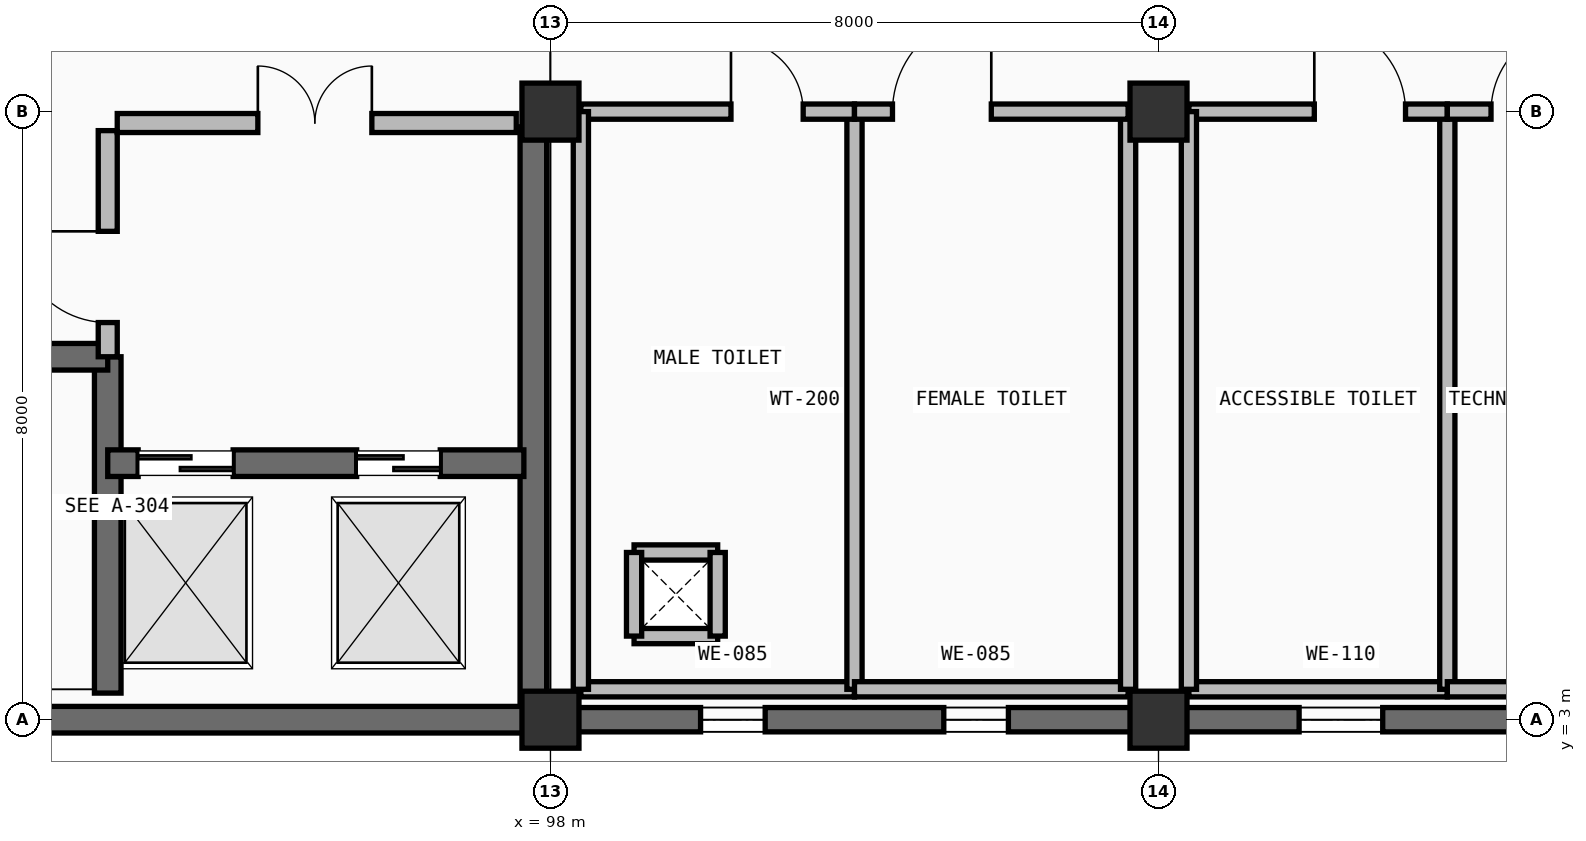
"""IFC4 building model, lengths in metres.
Left out: names, types, materials, properties, quantities, classifications, styles, units other than length and angle.
Written with IfcOpenShell. Run it as: python <this file> out.ifc"""

import sys

from ifc_helpers import new_model, si_unit, direction, frame, frame_2d, origin, origin_2d, place, context, subcontext, project, spatial, rectangle, extrude, element, fill, save


model = new_model("IFC4")
c1 = context("Model", 3, precision=1e-05, world=origin(), true_north=direction((0.0, 1.0)))
c2 = subcontext(c1, "Body", "Model", "MODEL_VIEW")
j1 = project(units=[si_unit("LENGTHUNIT", "METRE"), si_unit("PLANEANGLEUNIT", "RADIAN")], contexts=[c1])
p1 = place(None, origin())
s1 = spatial("IfcSite", under=j1, at=p1, CompositionType="ELEMENT")
p2 = place(p1, origin())
s2 = spatial("IfcBuilding", under=s1, at=p2, CompositionType="ELEMENT")
p3 = place(p2, origin())
s3 = spatial("IfcBuildingStorey", under=s2, at=p3, CompositionType="ELEMENT", Elevation=0.0)
for number, where, z_axis, x_axis in (
    (1, (98.0, 3.0, 0.0), (0.0, 0.0, 1.0), (1.0, 0.0, 0.0)),
    (2, (98.0, 11.0, 0.0), (0.0, 0.0, 1.0), (1.0, 0.0, 0.0)),
    (3, (106.0, 3.0, 0.0), (0.0, 0.0, 1.0), (1.0, 0.0, 0.0)),
    (4, (106.0, 11.0, 0.0), (0.0, 0.0, 1.0), (1.0, 0.0, 0.0)),
):
    element("IfcColumn", number, at=place(p3, frame(where, z_axis=z_axis, x_axis=x_axis)), inside=s3, PredefinedType="COLUMN", context=c2, shape_type="SweptSolid", body=[
        extrude(rectangle(XDim=0.75, YDim=0.75, at=origin_2d()), origin(), (0.0, 0.0, 1.0), 5.4),
    ])
p4 = place(p3, frame((114.0, 3.0, 0.0), z_axis=(0.0, 0.0, 1.0), x_axis=(-1.0, 0.0, 0.0)))
e5 = element("IfcWall", 5, at=p4, inside=s3, PredefinedType="SOLIDWALL", context=c2, shape_type="SweptSolid", body=[
    extrude(rectangle(XDim=8.0, YDim=0.32, at=frame_2d((4.0, 0.0))), origin(), (0.0, 0.0, 1.0), 5.4),
])
p5 = place(p4, frame((1.85, 0.0, 1.0)))
e6 = element("IfcOpeningElement", 6, at=p5, cuts=e5, PredefinedType="OPENING", context=c2, shape_type="SweptSolid", body=[
    extrude(rectangle(XDim=1.1, YDim=1.45, at=frame_2d((0.55, 0.725))), frame((0.0, 0.17, 0.0), z_axis=(0.0, -1.0, 0.0), x_axis=(1.0, 0.0, 0.0)), (0.0, 0.0, 1.0), 0.34),
])
p6 = place(p4, frame((5.05, 0.0, 1.0)))
e7 = element("IfcOpeningElement", 7, at=p6, cuts=e5, PredefinedType="OPENING", context=c2, shape_type="SweptSolid", body=[
    extrude(rectangle(XDim=1.1, YDim=1.45, at=frame_2d((0.55, 0.725))), frame((0.0, 0.17, 0.0), z_axis=(0.0, -1.0, 0.0), x_axis=(1.0, 0.0, 0.0)), (0.0, 0.0, 1.0), 0.34),
])
p7 = place(p3, frame((106.0, 3.0, 0.0), z_axis=(0.0, 0.0, 1.0), x_axis=(-1.0, 0.0, 0.0)))
e8 = element("IfcWall", 8, at=p7, inside=s3, PredefinedType="SOLIDWALL", context=c2, shape_type="SweptSolid", body=[
    extrude(rectangle(XDim=8.0, YDim=0.32, at=frame_2d((4.0, 0.0))), origin(), (0.0, 0.0, 1.0), 5.4),
])
p8 = place(p7, frame((1.975, 0.0, 1.0)))
e9 = element("IfcOpeningElement", 9, at=p8, cuts=e8, PredefinedType="OPENING", context=c2, shape_type="SweptSolid", body=[
    extrude(rectangle(XDim=0.85, YDim=1.2, at=frame_2d((0.425, 0.6))), frame((0.0, 0.17, 0.0), z_axis=(0.0, -1.0, 0.0), x_axis=(1.0, 0.0, 0.0)), (0.0, 0.0, 1.0), 0.34),
])
p9 = place(p7, frame((5.175, 0.0, 1.0)))
e10 = element("IfcOpeningElement", 10, at=p9, cuts=e8, PredefinedType="OPENING", context=c2, shape_type="SweptSolid", body=[
    extrude(rectangle(XDim=0.85, YDim=1.2, at=frame_2d((0.425, 0.6))), frame((0.0, 0.17, 0.0), z_axis=(0.0, -1.0, 0.0), x_axis=(1.0, 0.0, 0.0)), (0.0, 0.0, 1.0), 0.34),
])
p10 = place(p3, frame((98.0, 3.0, 0.0), z_axis=(0.0, 0.0, 1.0), x_axis=(-1.0, 0.0, 0.0)))
e11 = element("IfcWall", 11, at=p10, inside=s3, PredefinedType="SHEAR", context=c2, shape_type="SweptSolid", body=[
    extrude(rectangle(XDim=8.0, YDim=0.35, at=frame_2d((4.0, 0.0))), origin(), (0.0, 0.0, 1.0), 5.4),
])
p11 = place(p3, frame((92.175, 3.35, 0.0), z_axis=(0.0, 0.0, 1.0), x_axis=(0.0, 1.0, 0.0)))
e12 = element("IfcWall", 12, at=p11, inside=s3, PredefinedType="SHEAR", context=c2, shape_type="SweptSolid", body=[
    extrude(rectangle(XDim=4.425, YDim=0.35, at=frame_2d((2.212, 0.0))), origin(), (0.0, 0.0, 1.0), 5.1),
])
p12 = place(p3, frame((97.775, 3.2, 0.0), z_axis=(0.0, 0.0, 1.0), x_axis=(0.0, 1.0, 0.0)))
e13 = element("IfcWall", 13, at=p12, inside=s3, PredefinedType="SHEAR", context=c2, shape_type="SweptSolid", body=[
    extrude(rectangle(XDim=7.6, YDim=0.35, at=frame_2d((3.8, 0.0))), origin(), (0.0, 0.0, 1.0), 5.1),
])
p13 = place(p3, frame((82.35, 7.775, 0.0), z_axis=(0.0, 0.0, 1.0), x_axis=(1.0, 0.0, 0.0)))
e14 = element("IfcWall", 14, at=p13, inside=s3, PredefinedType="SHEAR", context=c2, shape_type="SweptSolid", body=[
    extrude(rectangle(XDim=9.825, YDim=0.35, at=frame_2d((4.913, 0.0))), origin(), (0.0, 0.0, 1.0), 5.1),
])
p14 = place(p13, frame((0.4, 0.0, 0.0)))
e15 = element("IfcOpeningElement", 15, at=p14, cuts=e14, PredefinedType="OPENING", context=c2, shape_type="SweptSolid", body=[
    extrude(rectangle(XDim=1.85, YDim=2.25, at=frame_2d((0.925, 1.125))), frame((0.0, 0.185, 0.0), z_axis=(0.0, -1.0, 0.0), x_axis=(1.0, 0.0, 0.0)), (0.0, 0.0, 1.0), 0.37),
])
p15 = place(p3, frame((92.175, 6.375, 0.0), z_axis=(0.0, 0.0, 1.0), x_axis=(1.0, 0.0, 0.0)))
e16 = element("IfcWall", 16, at=p15, inside=s3, PredefinedType="SHEAR", context=c2, shape_type="SweptSolid", body=[
    extrude(rectangle(XDim=5.475, YDim=0.35, at=frame_2d((2.737, 0.0))), origin(), (0.0, 0.0, 1.0), 5.1),
])
p16 = place(p15, frame((0.4, 0.0, 0.0)))
e17 = element("IfcOpeningElement", 17, at=p16, cuts=e16, PredefinedType="OPENING", context=c2, shape_type="SweptSolid", body=[
    extrude(rectangle(XDim=1.25, YDim=2.25, at=frame_2d((0.625, 1.125))), frame((0.0, 0.185, 0.0), z_axis=(0.0, -1.0, 0.0), x_axis=(1.0, 0.0, 0.0)), (0.0, 0.0, 1.0), 0.37),
])
p17 = place(p15, frame((3.275, 0.0, 0.0)))
e18 = element("IfcOpeningElement", 18, at=p17, cuts=e16, PredefinedType="OPENING", context=c2, shape_type="SweptSolid", body=[
    extrude(rectangle(XDim=1.1, YDim=2.2, at=frame_2d((0.55, 1.1))), frame((0.0, 0.185, 0.0), z_axis=(0.0, -1.0, 0.0), x_axis=(1.0, 0.0, 0.0)), (0.0, 0.0, 1.0), 0.37),
])
p18 = place(p3, frame((92.175, 7.775, 0.0), z_axis=(0.0, 0.0, 1.0), x_axis=(0.0, 1.0, 0.0)))
e19 = element("IfcWall", 19, at=p18, inside=s3, PredefinedType="PARTITIONING", context=c2, shape_type="SweptSolid", body=[
    extrude(rectangle(XDim=2.975, YDim=0.25, at=frame_2d((1.488, 0.0))), origin(), (0.0, 0.0, 1.0), 5.1),
])
p19 = place(p18, frame((0.45, 0.0, 0.0)))
e20 = element("IfcOpeningElement", 20, at=p19, cuts=e19, PredefinedType="OPENING", context=c2, shape_type="SweptSolid", body=[
    extrude(rectangle(XDim=1.2, YDim=2.2, at=frame_2d((0.6, 1.1))), frame((0.0, 0.135, 0.0), z_axis=(0.0, -1.0, 0.0), x_axis=(1.0, 0.0, 0.0)), (0.0, 0.0, 1.0), 0.27),
])
p20 = place(p3, frame((92.3, 10.85, 0.0), z_axis=(0.0, 0.0, 1.0), x_axis=(1.0, 0.0, 0.0)))
e21 = element("IfcWall", 21, at=p20, inside=s3, PredefinedType="PARTITIONING", context=c2, shape_type="SweptSolid", body=[
    extrude(rectangle(XDim=5.25, YDim=0.25, at=frame_2d((2.625, 0.0))), origin(), (0.0, 0.0, 1.0), 4.335),
])
p21 = place(p20, frame((1.85, 0.0, 0.0)))
e22 = element("IfcOpeningElement", 22, at=p21, cuts=e21, PredefinedType="OPENING", context=c2, shape_type="SweptSolid", body=[
    extrude(rectangle(XDim=1.5, YDim=2.2, at=frame_2d((0.75, 1.1))), frame((0.0, 0.135, 0.0), z_axis=(0.0, -1.0, 0.0), x_axis=(1.0, 0.0, 0.0)), (0.0, 0.0, 1.0), 0.27),
])
p22 = place(p3, frame((98.4, 3.4, 0.0), z_axis=(0.0, 0.0, 1.0), x_axis=(1.0, 0.0, 0.0)))
e23 = element("IfcWall", 23, at=p22, inside=s3, PredefinedType="PARTITIONING", context=c2, shape_type="SweptSolid", body=[
    extrude(rectangle(XDim=3.6, YDim=0.2, at=frame_2d((1.8, 0.0))), origin(), (0.0, 0.0, 1.0), 4.405),
])
p23 = place(p3, frame((102.0, 3.4, 0.0), z_axis=(0.0, 0.0, 1.0), x_axis=(0.0, 1.0, 0.0)))
e24 = element("IfcWall", 24, at=p23, inside=s3, PredefinedType="PARTITIONING", context=c2, shape_type="SweptSolid", body=[
    extrude(rectangle(XDim=7.6, YDim=0.2, at=frame_2d((3.8, 0.0))), origin(), (0.0, 0.0, 1.0), 4.535),
])
p24 = place(p3, frame((98.4, 11.0, 0.0), z_axis=(0.0, 0.0, 1.0), x_axis=(1.0, 0.0, 0.0)))
e25 = element("IfcWall", 25, at=p24, inside=s3, PredefinedType="PARTITIONING", context=c2, shape_type="SweptSolid", body=[
    extrude(rectangle(XDim=3.6, YDim=0.2, at=frame_2d((1.8, 0.0))), origin(), (0.0, 0.0, 1.0), 4.335),
])
p25 = place(p24, frame((1.975, 0.0, 0.0)))
e26 = element("IfcOpeningElement", 26, at=p25, cuts=e25, PredefinedType="OPENING", context=c2, shape_type="SweptSolid", body=[
    extrude(rectangle(XDim=0.95, YDim=2.1, at=frame_2d((0.475, 1.05))), frame((0.0, 0.11, 0.0), z_axis=(0.0, -1.0, 0.0), x_axis=(1.0, 0.0, 0.0)), (0.0, 0.0, 1.0), 0.22),
])
p26 = place(p3, frame((98.4, 3.4, 0.0), z_axis=(0.0, 0.0, 1.0), x_axis=(0.0, 1.0, 0.0)))
e27 = element("IfcWall", 27, at=p26, inside=s3, PredefinedType="PARTITIONING", context=c2, shape_type="SweptSolid", body=[
    extrude(rectangle(XDim=7.6, YDim=0.2, at=frame_2d((3.8, 0.0))), origin(), (0.0, 0.0, 1.0), 4.385),
])
p27 = place(p3, frame((102.0, 3.4, 0.0), z_axis=(0.0, 0.0, 1.0), x_axis=(1.0, 0.0, 0.0)))
e28 = element("IfcWall", 28, at=p27, inside=s3, PredefinedType="PARTITIONING", context=c2, shape_type="SweptSolid", body=[
    extrude(rectangle(XDim=3.6, YDim=0.2, at=frame_2d((1.8, 0.0))), origin(), (0.0, 0.0, 1.0), 4.405),
])
p28 = place(p3, frame((105.6, 3.4, 0.0), z_axis=(0.0, 0.0, 1.0), x_axis=(0.0, 1.0, 0.0)))
e29 = element("IfcWall", 29, at=p28, inside=s3, PredefinedType="PARTITIONING", context=c2, shape_type="SweptSolid", body=[
    extrude(rectangle(XDim=7.6, YDim=0.2, at=frame_2d((3.8, 0.0))), origin(), (0.0, 0.0, 1.0), 4.385),
])
p29 = place(p3, frame((102.0, 11.0, 0.0), z_axis=(0.0, 0.0, 1.0), x_axis=(1.0, 0.0, 0.0)))
e30 = element("IfcWall", 30, at=p29, inside=s3, PredefinedType="PARTITIONING", context=c2, shape_type="SweptSolid", body=[
    extrude(rectangle(XDim=3.6, YDim=0.2, at=frame_2d((1.8, 0.0))), origin(), (0.0, 0.0, 1.0), 4.335),
])
p30 = place(p29, frame((0.5, 0.0, 0.0)))
e31 = element("IfcOpeningElement", 31, at=p30, cuts=e30, PredefinedType="OPENING", context=c2, shape_type="SweptSolid", body=[
    extrude(rectangle(XDim=1.3, YDim=2.2, at=frame_2d((0.65, 1.1))), frame((0.0, 0.11, 0.0), z_axis=(0.0, -1.0, 0.0), x_axis=(1.0, 0.0, 0.0)), (0.0, 0.0, 1.0), 0.22),
])
p31 = place(p3, frame((106.4, 3.4, 0.0), z_axis=(0.0, 0.0, 1.0), x_axis=(1.0, 0.0, 0.0)))
e32 = element("IfcWall", 32, at=p31, inside=s3, PredefinedType="PARTITIONING", context=c2, shape_type="SweptSolid", body=[
    extrude(rectangle(XDim=3.4, YDim=0.2, at=frame_2d((1.7, 0.0))), origin(), (0.0, 0.0, 1.0), 4.405),
])
p32 = place(p3, frame((109.8, 3.4, 0.0), z_axis=(0.0, 0.0, 1.0), x_axis=(0.0, 1.0, 0.0)))
e33 = element("IfcWall", 33, at=p32, inside=s3, PredefinedType="PARTITIONING", context=c2, shape_type="SweptSolid", body=[
    extrude(rectangle(XDim=7.6, YDim=0.2, at=frame_2d((3.8, 0.0))), origin(), (0.0, 0.0, 1.0), 4.535),
])
p33 = place(p3, frame((106.4, 11.0, 0.0), z_axis=(0.0, 0.0, 1.0), x_axis=(1.0, 0.0, 0.0)))
e34 = element("IfcWall", 34, at=p33, inside=s3, PredefinedType="PARTITIONING", context=c2, shape_type="SweptSolid", body=[
    extrude(rectangle(XDim=3.4, YDim=0.2, at=frame_2d((1.7, 0.0))), origin(), (0.0, 0.0, 1.0), 4.335),
])
p34 = place(p33, frame((1.65, 0.0, 0.0)))
e35 = element("IfcOpeningElement", 35, at=p34, cuts=e34, PredefinedType="OPENING", context=c2, shape_type="SweptSolid", body=[
    extrude(rectangle(XDim=1.2, YDim=2.2, at=frame_2d((0.6, 1.1))), frame((0.0, 0.11, 0.0), z_axis=(0.0, -1.0, 0.0), x_axis=(1.0, 0.0, 0.0)), (0.0, 0.0, 1.0), 0.22),
])
p35 = place(p3, frame((106.4, 3.4, 0.0), z_axis=(0.0, 0.0, 1.0), x_axis=(0.0, 1.0, 0.0)))
e36 = element("IfcWall", 36, at=p35, inside=s3, PredefinedType="PARTITIONING", context=c2, shape_type="SweptSolid", body=[
    extrude(rectangle(XDim=7.6, YDim=0.2, at=frame_2d((3.8, 0.0))), origin(), (0.0, 0.0, 1.0), 4.385),
])
p36 = place(p3, frame((109.8, 3.4, 0.0), z_axis=(0.0, 0.0, 1.0), x_axis=(1.0, 0.0, 0.0)))
e37 = element("IfcWall", 37, at=p36, inside=s3, PredefinedType="PARTITIONING", context=c2, shape_type="SweptSolid", body=[
    extrude(rectangle(XDim=3.4, YDim=0.2, at=frame_2d((1.7, 0.0))), origin(), (0.0, 0.0, 1.0), 4.405),
])
p37 = place(p3, frame((109.8, 11.0, 0.0), z_axis=(0.0, 0.0, 1.0), x_axis=(1.0, 0.0, 0.0)))
e38 = element("IfcWall", 38, at=p37, inside=s3, PredefinedType="PARTITIONING", context=c2, shape_type="SweptSolid", body=[
    extrude(rectangle(XDim=3.4, YDim=0.2, at=frame_2d((1.7, 0.0))), origin(), (0.0, 0.0, 1.0), 4.335),
])
p38 = place(p37, frame((0.575, 0.0, 0.0)))
e39 = element("IfcOpeningElement", 39, at=p38, cuts=e38, PredefinedType="OPENING", context=c2, shape_type="SweptSolid", body=[
    extrude(rectangle(XDim=1.15, YDim=2.18, at=frame_2d((0.575, 1.09))), frame((0.0, 0.11, 0.0), z_axis=(0.0, -1.0, 0.0), x_axis=(1.0, 0.0, 0.0)), (0.0, 0.0, 1.0), 0.22),
])
for number, where, z_axis, x_axis in (
    (40, (99.1, 4.1, 0.0), (0.0, 0.0, 1.0), (1.0, 0.0, 0.0)),
    (41, (99.1, 5.2, 0.0), (0.0, 0.0, 1.0), (1.0, 0.0, 0.0)),
    (42, (99.1, 4.1, 0.0), (0.0, 0.0, 1.0), (0.0, 1.0, 0.0)),
    (43, (100.2, 4.1, 0.0), (0.0, 0.0, 1.0), (0.0, 1.0, 0.0)),
):
    element("IfcWall", number, at=place(p3, frame(where, z_axis=z_axis, x_axis=x_axis)), inside=s3, PredefinedType="PARTITIONING", context=c2, shape_type="SweptSolid", body=[
        extrude(rectangle(XDim=1.1, YDim=0.2, at=frame_2d((0.55, 0.0))), origin(), (0.0, 0.0, 1.0), 5.1),
    ])
p39 = place(p6, origin())
e44 = element("IfcWindow", 44, at=p39, inside=s3, PartitioningType="SINGLE_PANEL", PredefinedType="WINDOW", context=c2, shape_type="SweptSolid", body=[
    extrude(rectangle(XDim=1.1, YDim=1.45, at=frame_2d((0.55, 0.725))), frame((0.0, 0.03, 0.0), z_axis=(0.0, -1.0, 0.0), x_axis=(1.0, 0.0, 0.0)), (0.0, 0.0, 1.0), 0.06),
])
fill(e7, e44)
p40 = place(p8, origin())
e45 = element("IfcWindow", 45, at=p40, inside=s3, PartitioningType="SINGLE_PANEL", PredefinedType="WINDOW", context=c2, shape_type="SweptSolid", body=[
    extrude(rectangle(XDim=0.85, YDim=1.2, at=frame_2d((0.425, 0.6))), frame((0.0, 0.03, 0.0), z_axis=(0.0, -1.0, 0.0), x_axis=(1.0, 0.0, 0.0)), (0.0, 0.0, 1.0), 0.06),
])
fill(e9, e45)
p41 = place(p9, origin())
e46 = element("IfcWindow", 46, at=p41, inside=s3, PartitioningType="SINGLE_PANEL", PredefinedType="WINDOW", context=c2, shape_type="SweptSolid", body=[
    extrude(rectangle(XDim=0.85, YDim=1.2, at=frame_2d((0.425, 0.6))), frame((0.0, 0.03, 0.0), z_axis=(0.0, -1.0, 0.0), x_axis=(1.0, 0.0, 0.0)), (0.0, 0.0, 1.0), 0.06),
])
fill(e10, e46)
p42 = place(p16, origin())
e47 = element("IfcDoor", 47, at=p42, inside=s3, OperationType="DOUBLE_DOOR_SLIDING", PredefinedType="DOOR", context=c2, shape_type="SweptSolid", body=[
    extrude(rectangle(XDim=1.25, YDim=2.25, at=frame_2d((0.625, 1.125))), frame((0.0, 0.025, 0.0), z_axis=(0.0, -1.0, 0.0), x_axis=(1.0, 0.0, 0.0)), (0.0, 0.0, 1.0), 0.05),
])
fill(e17, e47)
p43 = place(p17, origin())
e48 = element("IfcDoor", 48, at=p43, inside=s3, OperationType="DOUBLE_DOOR_SLIDING", PredefinedType="DOOR", context=c2, shape_type="SweptSolid", body=[
    extrude(rectangle(XDim=1.1, YDim=2.2, at=frame_2d((0.55, 1.1))), frame((0.0, 0.025, 0.0), z_axis=(0.0, -1.0, 0.0), x_axis=(1.0, 0.0, 0.0)), (0.0, 0.0, 1.0), 0.05),
])
fill(e18, e48)
p44 = place(p19, origin())
e49 = element("IfcDoor", 49, at=p44, inside=s3, OperationType="SINGLE_SWING_RIGHT", PredefinedType="DOOR", context=c2, shape_type="SweptSolid", body=[
    extrude(rectangle(XDim=1.2, YDim=2.2, at=frame_2d((0.6, 1.1))), frame((0.0, 0.025, 0.0), z_axis=(0.0, -1.0, 0.0), x_axis=(1.0, 0.0, 0.0)), (0.0, 0.0, 1.0), 0.05),
])
fill(e20, e49)
p45 = place(p21, origin())
e50 = element("IfcDoor", 50, at=p45, inside=s3, OperationType="DOUBLE_DOOR_SINGLE_SWING", PredefinedType="DOOR", context=c2, shape_type="SweptSolid", body=[
    extrude(rectangle(XDim=1.5, YDim=2.2, at=frame_2d((0.75, 1.1))), frame((0.0, 0.025, 0.0), z_axis=(0.0, -1.0, 0.0), x_axis=(1.0, 0.0, 0.0)), (0.0, 0.0, 1.0), 0.05),
])
fill(e22, e50)
p46 = place(p25, origin())
e51 = element("IfcDoor", 51, at=p46, inside=s3, OperationType="SINGLE_SWING_LEFT", PredefinedType="DOOR", context=c2, shape_type="SweptSolid", body=[
    extrude(rectangle(XDim=0.95, YDim=2.1, at=frame_2d((0.475, 1.05))), frame((0.0, 0.025, 0.0), z_axis=(0.0, -1.0, 0.0), x_axis=(1.0, 0.0, 0.0)), (0.0, 0.0, 1.0), 0.05),
])
fill(e26, e51)
p47 = place(p30, origin())
e52 = element("IfcDoor", 52, at=p47, inside=s3, OperationType="SINGLE_SWING_RIGHT", PredefinedType="DOOR", context=c2, shape_type="SweptSolid", body=[
    extrude(rectangle(XDim=1.3, YDim=2.2, at=frame_2d((0.65, 1.1))), frame((0.0, 0.025, 0.0), z_axis=(0.0, -1.0, 0.0), x_axis=(1.0, 0.0, 0.0)), (0.0, 0.0, 1.0), 0.05),
])
fill(e31, e52)
p48 = place(p34, origin())
e53 = element("IfcDoor", 53, at=p48, inside=s3, OperationType="SINGLE_SWING_LEFT", PredefinedType="DOOR", context=c2, shape_type="SweptSolid", body=[
    extrude(rectangle(XDim=1.2, YDim=2.2, at=frame_2d((0.6, 1.1))), frame((0.0, 0.025, 0.0), z_axis=(0.0, -1.0, 0.0), x_axis=(1.0, 0.0, 0.0)), (0.0, 0.0, 1.0), 0.05),
])
fill(e35, e53)
p49 = place(p38, origin())
e54 = element("IfcDoor", 54, at=p49, inside=s3, OperationType="SINGLE_SWING_RIGHT", PredefinedType="DOOR", context=c2, shape_type="SweptSolid", body=[
    extrude(rectangle(XDim=1.15, YDim=2.18, at=frame_2d((0.575, 1.09))), frame((0.0, 0.025, 0.0), z_axis=(0.0, -1.0, 0.0), x_axis=(1.0, 0.0, 0.0)), (0.0, 0.0, 1.0), 0.05),
])
fill(e39, e54)
save(model, sys.argv[1])
